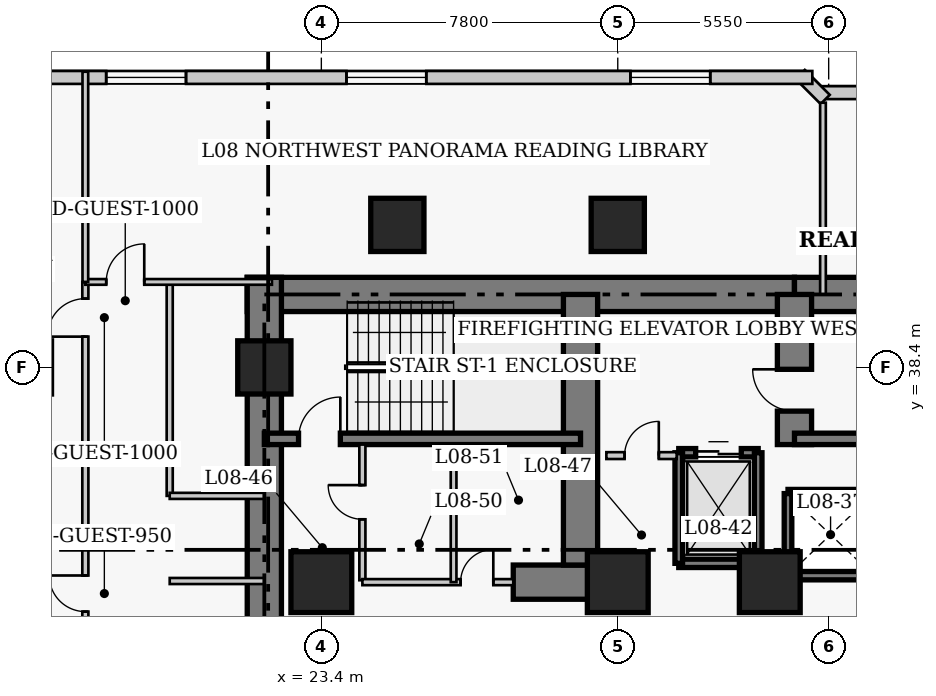
"""IFC4 building model, lengths in metres.
Left out: names, types, materials, properties, quantities, classifications, styles, units other than length and angle.
Written with IfcOpenShell. Run it as: python <this file> out.ifc"""

import sys

from ifc_helpers import new_model, si_unit, direction, frame, frame_2d, origin, origin_2d, place, context, subcontext, project, spatial, rectangle, extrude, element, fill, save


model = new_model("IFC4")
c1 = context("Model", 3, precision=1e-05, world=origin(), true_north=direction((0.0, 1.0)))
c2 = subcontext(c1, "Body", "Model", "MODEL_VIEW")
j1 = project(units=[si_unit("LENGTHUNIT", "METRE"), si_unit("PLANEANGLEUNIT", "RADIAN")], contexts=[c1])
p1 = place(None, origin())
s1 = spatial("IfcSite", under=j1, at=p1, CompositionType="ELEMENT")
p2 = place(p1, origin())
s2 = spatial("IfcBuilding", under=s1, at=p2, CompositionType="ELEMENT")
p3 = place(p2, frame((0.0, 0.0, 37.4)))
s3 = spatial("IfcBuildingStorey", under=s2, at=p3, CompositionType="ELEMENT", Elevation=37.4)
p4 = place(p3, frame((21.45, 40.32, 0.0), z_axis=(0.0, 0.0, 1.0), x_axis=(1.0, 0.0, 0.0)))
e1 = element("IfcWall", 1, at=p4, inside=s3, PredefinedType="SHEAR", context=c2, shape_type="SweptSolid", body=[
    extrude(rectangle(XDim=14.4, YDim=0.9, at=frame_2d((7.2, 0.0))), origin(), (0.0, 0.0, 1.0), 3.8),
])
p5 = place(p3, frame((35.85, 40.32, 0.0), z_axis=(0.0, 0.0, 1.0), x_axis=(1.0, 0.0, 0.0)))
e2 = element("IfcWall", 2, at=p5, inside=s3, PredefinedType="SHEAR", context=c2, shape_type="SweptSolid", body=[
    extrude(rectangle(XDim=12.6, YDim=0.9, at=frame_2d((6.3, 0.0))), origin(), (0.0, 0.0, 1.0), 3.8),
])
p6 = place(p3, frame((21.9, 27.05, 0.0), z_axis=(0.0, 0.0, 1.0), x_axis=(0.0, 1.0, 0.0)))
e3 = element("IfcWall", 3, at=p6, inside=s3, PredefinedType="SHEAR", context=c2, shape_type="SweptSolid", body=[
    extrude(rectangle(XDim=13.72, YDim=0.9, at=frame_2d((6.86, 0.0))), origin(), (0.0, 0.0, 1.0), 3.8),
])
p7 = place(p3, frame((28.45, 32.75, 0.0), z_axis=(0.0, 0.0, 1.0), x_axis=(1.0, 0.0, 0.0)))
e4 = element("IfcWall", 4, at=p7, inside=s3, PredefinedType="SHEAR", context=c2, shape_type="SweptSolid", body=[
    extrude(rectangle(XDim=2.4, YDim=0.9, at=frame_2d((1.2, 0.0))), origin(), (0.0, 0.0, 1.0), 3.8),
])
p8 = place(p3, frame((30.22, 33.2, 0.0), z_axis=(0.0, 0.0, 1.0), x_axis=(0.0, 1.0, 0.0)))
e5 = element("IfcWall", 5, at=p8, inside=s3, PredefinedType="SHEAR", context=c2, shape_type="SweptSolid", body=[
    extrude(rectangle(XDim=7.12, YDim=0.9, at=frame_2d((3.56, 0.0))), origin(), (0.0, 0.0, 1.0), 3.8),
])
p9 = place(p3, frame((35.85, 36.37, 0.0), z_axis=(0.0, 0.0, 1.0), x_axis=(0.0, 1.0, 0.0)))
e6 = element("IfcWall", 6, at=p9, inside=s3, PredefinedType="SHEAR", context=c2, shape_type="SweptSolid", body=[
    extrude(rectangle(XDim=3.95, YDim=0.9, at=frame_2d((1.975, 0.0))), origin(), (0.0, 0.0, 1.0), 3.8),
])
p10 = place(p9, frame((0.88, 0.0, 0.0)))
e7 = element("IfcOpeningElement", 7, at=p10, cuts=e6, PredefinedType="OPENING", context=c2, shape_type="SweptSolid", body=[
    extrude(rectangle(XDim=1.1, YDim=2.15, at=frame_2d((0.55, 1.075))), frame((0.0, 0.46, 0.0), z_axis=(0.0, -1.0, 0.0), x_axis=(1.0, 0.0, 0.0)), (0.0, 0.0, 1.0), 0.92),
])
p11 = place(p3, frame((21.9, 36.52, 0.0), z_axis=(0.0, 0.0, 1.0), x_axis=(1.0, 0.0, 0.0)))
e8 = element("IfcWall", 8, at=p11, inside=s3, PredefinedType="SHEAR", context=c2, shape_type="SweptSolid", body=[
    extrude(rectangle(XDim=8.32, YDim=0.3, at=frame_2d((4.16, 0.0))), origin(), (0.0, 0.0, 1.0), 3.8),
])
p12 = place(p11, frame((0.9, 0.0, 0.0)))
e9 = element("IfcOpeningElement", 9, at=p12, cuts=e8, PredefinedType="OPENING", context=c2, shape_type="SweptSolid", body=[
    extrude(rectangle(XDim=1.1, YDim=2.15, at=frame_2d((0.55, 1.075))), frame((0.0, 0.16, 0.0), z_axis=(0.0, -1.0, 0.0), x_axis=(1.0, 0.0, 0.0)), (0.0, 0.0, 1.0), 0.32),
])
p13 = place(p3, frame((35.85, 36.52, 0.0), z_axis=(0.0, 0.0, 1.0), x_axis=(1.0, 0.0, 0.0)))
e10 = element("IfcWall", 10, at=p13, inside=s3, PredefinedType="SHEAR", context=c2, shape_type="SweptSolid", body=[
    extrude(rectangle(XDim=8.33, YDim=0.3, at=frame_2d((4.165, 0.0))), origin(), (0.0, 0.0, 1.0), 3.8),
])
p14 = place(p3, frame((21.9, 38.4, 0.0), z_axis=(0.0, 0.0, 1.0), x_axis=(1.0, 0.0, 0.0)))
e11 = element("IfcColumn", 11, at=p14, inside=s3, PredefinedType="COLUMN", context=c2, shape_type="SweptSolid", body=[
    extrude(rectangle(XDim=1.4, YDim=1.4, at=origin_2d()), origin(), (0.0, 0.0, 1.0), 3.8),
])
for number, where, z_axis, x_axis in (
    (12, (23.4, 32.75, 0.0), (0.0, 0.0, 1.0), (1.0, 0.0, 0.0)),
    (13, (31.2, 32.75, 0.0), (0.0, 0.0, 1.0), (1.0, 0.0, 0.0)),
    (14, (35.2, 32.75, 0.0), (0.0, 0.0, 1.0), (1.0, 0.0, 0.0)),
):
    element("IfcColumn", number, at=place(p3, frame(where, z_axis=z_axis, x_axis=x_axis)), inside=s3, PredefinedType="COLUMN", context=c2, shape_type="SweptSolid", body=[
        extrude(rectangle(XDim=1.6, YDim=1.6, at=origin_2d()), origin(), (0.0, 0.0, 1.0), 3.8),
    ])
for number, where, z_axis, x_axis in (
    (15, (25.4, 42.15, 0.0), (0.0, 0.0, 1.0), (1.0, 0.0, 0.0)),
    (16, (31.2, 42.15, 0.0), (0.0, 0.0, 1.0), (1.0, 0.0, 0.0)),
):
    element("IfcColumn", number, at=place(p3, frame(where, z_axis=z_axis, x_axis=x_axis)), inside=s3, PredefinedType="COLUMN", context=c2, shape_type="SweptSolid", body=[
        extrude(rectangle(XDim=1.4, YDim=1.4, at=origin_2d()), origin(), (0.0, 0.0, 1.0), 3.8),
    ])
p15 = place(p3, frame((41.42, 45.63, 0.0), z_axis=(0.0, 0.0, 1.0), x_axis=(-1.0, 0.0, 0.0)))
e17 = element("IfcWall", 17, at=p15, inside=s3, PredefinedType="SOLIDWALL", context=c2, shape_type="SweptSolid", body=[
    extrude(rectangle(XDim=4.84, YDim=0.34, at=frame_2d((2.42, 0.0))), origin(), (0.0, 0.0, 1.0), 3.54),
])
p16 = place(p15, frame((1.37, 0.0, 0.85)))
e18 = element("IfcOpeningElement", 18, at=p16, cuts=e17, PredefinedType="OPENING", context=c2, shape_type="SweptSolid", body=[
    extrude(rectangle(XDim=2.1, YDim=1.85, at=frame_2d((1.05, 0.925))), frame((0.0, 0.18, 0.0), z_axis=(0.0, -1.0, 0.0), x_axis=(1.0, 0.0, 0.0)), (0.0, 0.0, 1.0), 0.36),
])
p17 = place(p3, frame((36.658, 45.451, 0.0), z_axis=(0.0, 0.0, 1.0), x_axis=(-0.707106781187, 0.707106781187, 0.0)))
e19 = element("IfcWall", 19, at=p17, inside=s3, PredefinedType="SOLIDWALL", context=c2, shape_type="SweptSolid", body=[
    extrude(rectangle(XDim=0.929, YDim=0.34, at=frame_2d((0.464, 0.0))), origin(), (0.0, 0.0, 1.0), 3.54),
])
p18 = place(p3, frame((36.32, 46.03, 0.0), z_axis=(0.0, 0.0, 1.0), x_axis=(-1.0, 0.0, 0.0)))
e20 = element("IfcWall", 20, at=p18, inside=s3, PredefinedType="SOLIDWALL", context=c2, shape_type="SweptSolid", body=[
    extrude(rectangle(XDim=29.89, YDim=0.34, at=frame_2d((14.945, 0.0))), origin(), (0.0, 0.0, 1.0), 3.54),
])
p19 = place(p18, frame((2.686, 0.0, 0.85)))
e21 = element("IfcOpeningElement", 21, at=p19, cuts=e20, PredefinedType="OPENING", context=c2, shape_type="SweptSolid", body=[
    extrude(rectangle(XDim=2.1, YDim=1.85, at=frame_2d((1.05, 0.925))), frame((0.0, 0.18, 0.0), z_axis=(0.0, -1.0, 0.0), x_axis=(1.0, 0.0, 0.0)), (0.0, 0.0, 1.0), 0.36),
])
p20 = place(p18, frame((10.159, 0.0, 0.85)))
e22 = element("IfcOpeningElement", 22, at=p20, cuts=e20, PredefinedType="OPENING", context=c2, shape_type="SweptSolid", body=[
    extrude(rectangle(XDim=2.1, YDim=1.85, at=frame_2d((1.05, 0.925))), frame((0.0, 0.18, 0.0), z_axis=(0.0, -1.0, 0.0), x_axis=(1.0, 0.0, 0.0)), (0.0, 0.0, 1.0), 0.36),
])
p21 = place(p18, frame((16.481, 0.0, 0.85)))
e23 = element("IfcOpeningElement", 23, at=p21, cuts=e20, PredefinedType="OPENING", context=c2, shape_type="SweptSolid", body=[
    extrude(rectangle(XDim=2.1, YDim=1.85, at=frame_2d((1.05, 0.925))), frame((0.0, 0.18, 0.0), z_axis=(0.0, -1.0, 0.0), x_axis=(1.0, 0.0, 0.0)), (0.0, 0.0, 1.0), 0.36),
])
p22 = place(p18, frame((25.104, 0.0, 0.85)))
e24 = element("IfcOpeningElement", 24, at=p22, cuts=e20, PredefinedType="OPENING", context=c2, shape_type="SweptSolid", body=[
    extrude(rectangle(XDim=2.1, YDim=1.85, at=frame_2d((1.05, 0.925))), frame((0.0, 0.18, 0.0), z_axis=(0.0, -1.0, 0.0), x_axis=(1.0, 0.0, 0.0)), (0.0, 0.0, 1.0), 0.36),
])
for number, where, z_axis, x_axis in (
    (25, (35.68, 35.08, 0.0), (0.0, 0.0, 1.0), (1.0, 0.0, 0.0)),
    (26, (35.68, 32.92, 0.0), (0.0, 0.0, 1.0), (1.0, 0.0, 0.0)),
):
    element("IfcWall", number, at=place(p3, frame(where, z_axis=z_axis, x_axis=x_axis)), inside=s3, PredefinedType="SHEAR", context=c2, shape_type="SweptSolid", body=[
        extrude(rectangle(XDim=2.32, YDim=0.22, at=frame_2d((1.16, 0.0))), origin(), (0.0, 0.0, 1.0), 3.8),
    ])
p23 = place(p3, frame((35.68, 32.92, 0.0), z_axis=(0.0, 0.0, 1.0), x_axis=(0.0, 1.0, 0.0)))
e27 = element("IfcWall", 27, at=p23, inside=s3, PredefinedType="SHEAR", context=c2, shape_type="SweptSolid", body=[
    extrude(rectangle(XDim=2.16, YDim=0.2, at=frame_2d((1.08, 0.0))), origin(), (0.0, 0.0, 1.0), 3.8),
])
p24 = place(p3, frame((32.805, 36.155, 0.0), z_axis=(0.0, 0.0, 1.0), x_axis=(1.0, 0.0, 0.0)))
e28 = element("IfcWall", 28, at=p24, inside=s3, PredefinedType="SHEAR", context=c2, shape_type="SweptSolid", body=[
    extrude(rectangle(XDim=2.09, YDim=0.22, at=frame_2d((1.045, 0.0))), origin(), (0.0, 0.0, 1.0), 3.8),
])
p25 = place(p24, frame((0.445, 0.0, 0.0)))
e29 = element("IfcOpeningElement", 29, at=p25, cuts=e28, PredefinedType="OPENING", context=c2, shape_type="SweptSolid", body=[
    extrude(rectangle(XDim=1.2, YDim=2.15, at=frame_2d((0.6, 1.075))), frame((0.0, 0.12, 0.0), z_axis=(0.0, -1.0, 0.0), x_axis=(1.0, 0.0, 0.0)), (0.0, 0.0, 1.0), 0.24),
])
p26 = place(p3, frame((32.805, 33.245, 0.0), z_axis=(0.0, 0.0, 1.0), x_axis=(1.0, 0.0, 0.0)))
e30 = element("IfcWall", 30, at=p26, inside=s3, PredefinedType="SHEAR", context=c2, shape_type="SweptSolid", body=[
    extrude(rectangle(XDim=2.09, YDim=0.22, at=frame_2d((1.045, 0.0))), origin(), (0.0, 0.0, 1.0), 3.8),
])
for number, where, z_axis, x_axis in (
    (31, (32.805, 33.245, 0.0), (0.0, 0.0, 1.0), (0.0, 1.0, 0.0)),
    (32, (34.895, 33.245, 0.0), (0.0, 0.0, 1.0), (0.0, 1.0, 0.0)),
):
    element("IfcWall", number, at=place(p3, frame(where, z_axis=z_axis, x_axis=x_axis)), inside=s3, PredefinedType="SHEAR", context=c2, shape_type="SweptSolid", body=[
        extrude(rectangle(XDim=2.91, YDim=0.2, at=frame_2d((1.455, 0.0))), origin(), (0.0, 0.0, 1.0), 3.8),
    ])
p27 = place(p3, frame((30.9, 36.08, 0.0), z_axis=(0.0, 0.0, 1.0), x_axis=(1.0, 0.0, 0.0)))
e33 = element("IfcWall", 33, at=p27, inside=s3, PredefinedType="PARTITIONING", context=c2, shape_type="SweptSolid", body=[
    extrude(rectangle(XDim=1.85, YDim=0.18, at=frame_2d((0.925, 0.0))), origin(), (0.0, 0.0, 1.0), 3.54),
])
p28 = place(p27, frame((0.48, 0.0, 0.0)))
e34 = element("IfcOpeningElement", 34, at=p28, cuts=e33, PredefinedType="OPENING", context=c2, shape_type="SweptSolid", body=[
    extrude(rectangle(XDim=0.9, YDim=2.15, at=frame_2d((0.45, 1.075))), frame((0.0, 0.1, 0.0), z_axis=(0.0, -1.0, 0.0), x_axis=(1.0, 0.0, 0.0)), (0.0, 0.0, 1.0), 0.2),
])
p29 = place(p3, frame((24.48, 32.8, 0.0), z_axis=(0.0, 0.0, 1.0), x_axis=(0.0, 1.0, 0.0)))
e35 = element("IfcWall", 35, at=p29, inside=s3, PredefinedType="PARTITIONING", context=c2, shape_type="SweptSolid", body=[
    extrude(rectangle(XDim=3.57, YDim=0.16, at=frame_2d((1.785, 0.0))), origin(), (0.0, 0.0, 1.0), 3.54),
])
p30 = place(p29, frame((1.604, 0.0, 0.0)))
e36 = element("IfcOpeningElement", 36, at=p30, cuts=e35, PredefinedType="OPENING", context=c2, shape_type="SweptSolid", body=[
    extrude(rectangle(XDim=0.9, YDim=2.1, at=frame_2d((0.45, 1.05))), frame((0.0, 0.09, 0.0), z_axis=(0.0, -1.0, 0.0), x_axis=(1.0, 0.0, 0.0)), (0.0, 0.0, 1.0), 0.18),
])
p31 = place(p3, frame((24.48, 32.75, 0.0), z_axis=(0.0, 0.0, 1.0), x_axis=(1.0, 0.0, 0.0)))
e37 = element("IfcWall", 37, at=p31, inside=s3, PredefinedType="PARTITIONING", context=c2, shape_type="SweptSolid", body=[
    extrude(rectangle(XDim=3.97, YDim=0.16, at=frame_2d((1.985, 0.0))), origin(), (0.0, 0.0, 1.0), 3.54),
])
p32 = place(p31, frame((2.585, 0.0, 0.0)))
e38 = element("IfcOpeningElement", 38, at=p32, cuts=e37, PredefinedType="OPENING", context=c2, shape_type="SweptSolid", body=[
    extrude(rectangle(XDim=0.86, YDim=2.05, at=frame_2d((0.43, 1.025))), frame((0.0, 0.09, 0.0), z_axis=(0.0, -1.0, 0.0), x_axis=(1.0, 0.0, 0.0)), (0.0, 0.0, 1.0), 0.18),
])
p33 = place(p3, frame((26.88, 32.75, 0.0), z_axis=(0.0, 0.0, 1.0), x_axis=(0.0, 1.0, 0.0)))
e39 = element("IfcWall", 39, at=p33, inside=s3, PredefinedType="PARTITIONING", context=c2, shape_type="SweptSolid", body=[
    extrude(rectangle(XDim=3.62, YDim=0.15, at=frame_2d((1.81, 0.0))), origin(), (0.0, 0.0, 1.0), 3.54),
])
p34 = place(p3, frame((17.19, 5.05, 0.0), z_axis=(0.0, 0.0, 1.0), x_axis=(0.0, 1.0, 0.0)))
e40 = element("IfcWall", 40, at=p34, inside=s3, PredefinedType="PARTITIONING", context=c2, shape_type="SweptSolid", body=[
    extrude(rectangle(XDim=35.6, YDim=0.16, at=frame_2d((17.8, 0.0))), origin(), (0.0, 0.0, 1.0), 3.54),
])
p35 = place(p34, frame((2.6, 0.0, 0.0)))
e41 = element("IfcOpeningElement", 41, at=p35, cuts=e40, PredefinedType="OPENING", context=c2, shape_type="SweptSolid", body=[
    extrude(rectangle(XDim=0.95, YDim=2.1, at=frame_2d((0.475, 1.05))), frame((0.0, 0.09, 0.0), z_axis=(0.0, -1.0, 0.0), x_axis=(1.0, 0.0, 0.0)), (0.0, 0.0, 1.0), 0.18),
])
p36 = place(p34, frame((10.075, 0.0, 0.0)))
e42 = element("IfcOpeningElement", 42, at=p36, cuts=e40, PredefinedType="OPENING", context=c2, shape_type="SweptSolid", body=[
    extrude(rectangle(XDim=0.95, YDim=2.1, at=frame_2d((0.475, 1.05))), frame((0.0, 0.09, 0.0), z_axis=(0.0, -1.0, 0.0), x_axis=(1.0, 0.0, 0.0)), (0.0, 0.0, 1.0), 0.18),
])
p37 = place(p34, frame((18.875, 0.0, 0.0)))
e43 = element("IfcOpeningElement", 43, at=p37, cuts=e40, PredefinedType="OPENING", context=c2, shape_type="SweptSolid", body=[
    extrude(rectangle(XDim=0.95, YDim=2.1, at=frame_2d((0.475, 1.05))), frame((0.0, 0.09, 0.0), z_axis=(0.0, -1.0, 0.0), x_axis=(1.0, 0.0, 0.0)), (0.0, 0.0, 1.0), 0.18),
])
p38 = place(p34, frame((26.925, 0.0, 0.0)))
e44 = element("IfcOpeningElement", 44, at=p38, cuts=e40, PredefinedType="OPENING", context=c2, shape_type="SweptSolid", body=[
    extrude(rectangle(XDim=0.95, YDim=2.1, at=frame_2d((0.475, 1.05))), frame((0.0, 0.09, 0.0), z_axis=(0.0, -1.0, 0.0), x_axis=(1.0, 0.0, 0.0)), (0.0, 0.0, 1.0), 0.18),
])
p39 = place(p34, frame((34.16, 0.0, 0.0)))
e45 = element("IfcOpeningElement", 45, at=p39, cuts=e40, PredefinedType="OPENING", context=c2, shape_type="SweptSolid", body=[
    extrude(rectangle(XDim=1.0, YDim=2.15, at=frame_2d((0.5, 1.075))), frame((0.0, 0.09, 0.0), z_axis=(0.0, -1.0, 0.0), x_axis=(1.0, 0.0, 0.0)), (0.0, 0.0, 1.0), 0.18),
])
p40 = place(p3, frame((19.41, 35.02, 0.0), z_axis=(0.0, 0.0, 1.0), x_axis=(0.0, 1.0, 0.0)))
e46 = element("IfcWall", 46, at=p40, inside=s3, PredefinedType="PARTITIONING", context=c2, shape_type="SweptSolid", body=[
    extrude(rectangle(XDim=5.63, YDim=0.16, at=frame_2d((2.815, 0.0))), origin(), (0.0, 0.0, 1.0), 3.54),
])
for number, where, z_axis, x_axis in (
    (47, (19.41, 35.02, 0.0), (0.0, 0.0, 1.0), (1.0, 0.0, 0.0)),
    (48, (19.41, 32.78, 0.0), (0.0, 0.0, 1.0), (1.0, 0.0, 0.0)),
):
    element("IfcWall", number, at=place(p3, frame(where, z_axis=z_axis, x_axis=x_axis)), inside=s3, PredefinedType="PARTITIONING", context=c2, shape_type="SweptSolid", body=[
        extrude(rectangle(XDim=2.49, YDim=0.16, at=frame_2d((1.245, 0.0))), origin(), (0.0, 0.0, 1.0), 3.54),
    ])
p41 = place(p3, frame((17.19, 40.65, 0.0), z_axis=(0.0, 0.0, 1.0), x_axis=(1.0, 0.0, 0.0)))
e49 = element("IfcWall", 49, at=p41, inside=s3, PredefinedType="PARTITIONING", context=c2, shape_type="SweptSolid", body=[
    extrude(rectangle(XDim=4.91, YDim=0.15, at=frame_2d((2.455, 0.0))), origin(), (0.0, 0.0, 1.0), 3.54),
])
p42 = place(p41, frame((0.55, 0.0, 0.0)))
e50 = element("IfcOpeningElement", 50, at=p42, cuts=e49, PredefinedType="OPENING", context=c2, shape_type="SweptSolid", body=[
    extrude(rectangle(XDim=1.0, YDim=2.15, at=frame_2d((0.5, 1.075))), frame((0.0, 0.085, 0.0), z_axis=(0.0, -1.0, 0.0), x_axis=(1.0, 0.0, 0.0)), (0.0, 0.0, 1.0), 0.17),
])
p43 = place(p3, frame((17.19, 40.65, 0.0), z_axis=(0.0, 0.0, 1.0), x_axis=(0.0, 1.0, 0.0)))
e51 = element("IfcWall", 51, at=p43, inside=s3, PredefinedType="PARTITIONING", context=c2, shape_type="SweptSolid", body=[
    extrude(rectangle(XDim=5.53, YDim=0.15, at=frame_2d((2.765, 0.0))), origin(), (0.0, 0.0, 1.0), 3.54),
])
p44 = place(p3, frame((36.6, 40.32, 0.0), z_axis=(0.0, 0.0, 1.0), x_axis=(0.0, 1.0, 0.0)))
e52 = element("IfcWall", 52, at=p44, inside=s3, PredefinedType="PARTITIONING", context=c2, shape_type="SweptSolid", body=[
    extrude(rectangle(XDim=5.045, YDim=0.15, at=frame_2d((2.522, 0.0))), origin(), (0.0, 0.0, 1.0), 3.54),
])
p45 = place(p3, frame((14.45, 36.1, 0.0), z_axis=(0.0, 0.0, 1.0), x_axis=(1.0, 0.0, 0.0)))
e53 = element("IfcWall", 53, at=p45, inside=s3, PredefinedType="PARTITIONING", context=c2, shape_type="SweptSolid", body=[
    extrude(rectangle(XDim=2.74, YDim=0.15, at=frame_2d((1.37, 0.0))), origin(), (0.0, 0.0, 1.0), 3.54),
])
p46 = place(p19, origin())
e54 = element("IfcWindow", 54, at=p46, inside=s3, PartitioningType="SINGLE_PANEL", PredefinedType="WINDOW", context=c2, shape_type="SweptSolid", body=[
    extrude(rectangle(XDim=2.1, YDim=1.85, at=frame_2d((1.05, 0.925))), frame((0.0, 0.03, 0.0), z_axis=(0.0, -1.0, 0.0), x_axis=(1.0, 0.0, 0.0)), (0.0, 0.0, 1.0), 0.06),
])
fill(e21, e54)
p47 = place(p20, origin())
e55 = element("IfcWindow", 55, at=p47, inside=s3, PartitioningType="SINGLE_PANEL", PredefinedType="WINDOW", context=c2, shape_type="SweptSolid", body=[
    extrude(rectangle(XDim=2.1, YDim=1.85, at=frame_2d((1.05, 0.925))), frame((0.0, 0.03, 0.0), z_axis=(0.0, -1.0, 0.0), x_axis=(1.0, 0.0, 0.0)), (0.0, 0.0, 1.0), 0.06),
])
fill(e22, e55)
p48 = place(p21, origin())
e56 = element("IfcWindow", 56, at=p48, inside=s3, PartitioningType="SINGLE_PANEL", PredefinedType="WINDOW", context=c2, shape_type="SweptSolid", body=[
    extrude(rectangle(XDim=2.1, YDim=1.85, at=frame_2d((1.05, 0.925))), frame((0.0, 0.03, 0.0), z_axis=(0.0, -1.0, 0.0), x_axis=(1.0, 0.0, 0.0)), (0.0, 0.0, 1.0), 0.06),
])
fill(e23, e56)
p49 = place(p25, origin())
e57 = element("IfcDoor", 57, at=p49, inside=s3, OperationType="DOUBLE_DOOR_SLIDING", PredefinedType="DOOR", context=c2, shape_type="SweptSolid", body=[
    extrude(rectangle(XDim=1.2, YDim=2.15, at=frame_2d((0.6, 1.075))), frame((0.0, 0.025, 0.0), z_axis=(0.0, -1.0, 0.0), x_axis=(1.0, 0.0, 0.0)), (0.0, 0.0, 1.0), 0.05),
])
fill(e29, e57)
p50 = place(p28, origin())
e58 = element("IfcDoor", 58, at=p50, inside=s3, OperationType="SINGLE_SWING_RIGHT", PredefinedType="DOOR", context=c2, shape_type="SweptSolid", body=[
    extrude(rectangle(XDim=0.9, YDim=2.15, at=frame_2d((0.45, 1.075))), frame((0.0, 0.025, 0.0), z_axis=(0.0, -1.0, 0.0), x_axis=(1.0, 0.0, 0.0)), (0.0, 0.0, 1.0), 0.05),
])
fill(e34, e58)
p51 = place(p30, origin())
e59 = element("IfcDoor", 59, at=p51, inside=s3, OperationType="SINGLE_SWING_RIGHT", PredefinedType="DOOR", context=c2, shape_type="SweptSolid", body=[
    extrude(rectangle(XDim=0.9, YDim=2.1, at=frame_2d((0.45, 1.05))), frame((0.0, 0.025, 0.0), z_axis=(0.0, -1.0, 0.0), x_axis=(1.0, 0.0, 0.0)), (0.0, 0.0, 1.0), 0.05),
])
fill(e36, e59)
p52 = place(p32, origin())
e60 = element("IfcDoor", 60, at=p52, inside=s3, OperationType="SINGLE_SWING_RIGHT", PredefinedType="DOOR", context=c2, shape_type="SweptSolid", body=[
    extrude(rectangle(XDim=0.86, YDim=2.05, at=frame_2d((0.43, 1.025))), frame((0.0, 0.025, 0.0), z_axis=(0.0, -1.0, 0.0), x_axis=(1.0, 0.0, 0.0)), (0.0, 0.0, 1.0), 0.05),
])
fill(e38, e60)
p53 = place(p42, origin())
e61 = element("IfcDoor", 61, at=p53, inside=s3, OperationType="SINGLE_SWING_RIGHT", PredefinedType="DOOR", context=c2, shape_type="SweptSolid", body=[
    extrude(rectangle(XDim=1.0, YDim=2.15, at=frame_2d((0.5, 1.075))), frame((0.0, 0.025, 0.0), z_axis=(0.0, -1.0, 0.0), x_axis=(1.0, 0.0, 0.0)), (0.0, 0.0, 1.0), 0.05),
])
fill(e50, e61)
p54 = place(p38, origin())
e62 = element("IfcDoor", 62, at=p54, inside=s3, OperationType="SINGLE_SWING_RIGHT", PredefinedType="DOOR", context=c2, shape_type="SweptSolid", body=[
    extrude(rectangle(XDim=0.95, YDim=2.1, at=frame_2d((0.475, 1.05))), frame((0.0, 0.025, 0.0), z_axis=(0.0, -1.0, 0.0), x_axis=(1.0, 0.0, 0.0)), (0.0, 0.0, 1.0), 0.05),
])
fill(e44, e62)
p55 = place(p39, origin())
e63 = element("IfcDoor", 63, at=p55, inside=s3, OperationType="SINGLE_SWING_LEFT", PredefinedType="DOOR", context=c2, shape_type="SweptSolid", body=[
    extrude(rectangle(XDim=1.0, YDim=2.15, at=frame_2d((0.5, 1.075))), frame((0.0, 0.025, 0.0), z_axis=(0.0, -1.0, 0.0), x_axis=(1.0, 0.0, 0.0)), (0.0, 0.0, 1.0), 0.05),
])
fill(e45, e63)
p56 = place(p12, origin())
e64 = element("IfcDoor", 64, at=p56, inside=s3, OperationType="SINGLE_SWING_RIGHT", PredefinedType="DOOR", context=c2, shape_type="SweptSolid", body=[
    extrude(rectangle(XDim=1.1, YDim=2.15, at=frame_2d((0.55, 1.075))), frame((0.0, 0.025, 0.0), z_axis=(0.0, -1.0, 0.0), x_axis=(1.0, 0.0, 0.0)), (0.0, 0.0, 1.0), 0.05),
])
fill(e9, e64)
p57 = place(p10, origin())
e65 = element("IfcDoor", 65, at=p57, inside=s3, OperationType="SINGLE_SWING_RIGHT", PredefinedType="DOOR", context=c2, shape_type="SweptSolid", body=[
    extrude(rectangle(XDim=1.1, YDim=2.15, at=frame_2d((0.55, 1.075))), frame((0.0, 0.025, 0.0), z_axis=(0.0, -1.0, 0.0), x_axis=(1.0, 0.0, 0.0)), (0.0, 0.0, 1.0), 0.05),
])
fill(e7, e65)
save(model, sys.argv[1])
